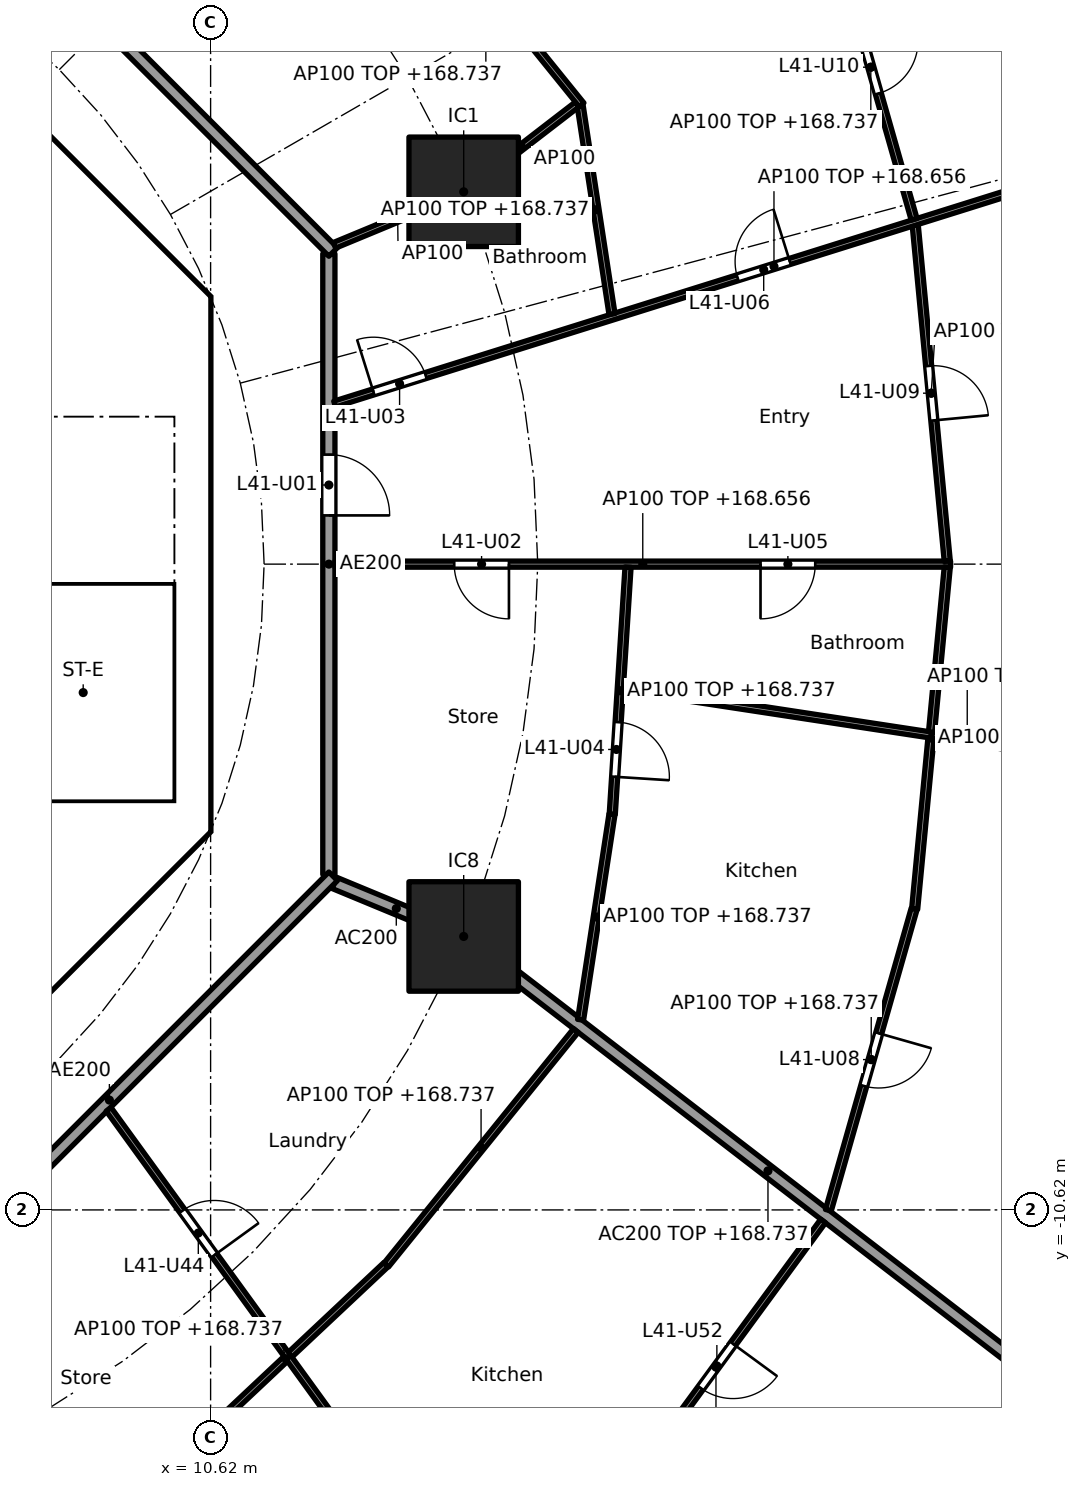
"""IFC4 building model, lengths in metres.
Left out: names, types, materials, properties, quantities, classifications, styles, units other than length and angle.
Written with IfcOpenShell. Run it as: python <this file> out.ifc"""

import sys

from ifc_helpers import new_model, si_unit, direction, frame, frame_2d, origin, origin_2d, place, context, subcontext, project, spatial, polyline, rectangle, outline, extrude, element, fill, save


model = new_model("IFC4")
c1 = context("Model", 3, precision=1e-05, world=origin(), true_north=direction((0.0, 1.0)))
c2 = subcontext(c1, "Body", "Model", "MODEL_VIEW")
j1 = project(units=[si_unit("LENGTHUNIT", "METRE"), si_unit("PLANEANGLEUNIT", "RADIAN")], contexts=[c1])
p1 = place(None, origin())
s1 = spatial("IfcSite", under=j1, at=p1, CompositionType="ELEMENT")
p2 = place(p1, origin())
s2 = spatial("IfcBuilding", under=s1, at=p2, CompositionType="ELEMENT")
p3 = place(p2, frame((0.0, 0.0, 165.9)))
s3 = spatial("IfcBuildingStorey", under=s2, at=p3, CompositionType="ELEMENT", Elevation=165.9)
for number, where, z_axis, x_axis in (
    (1, (14.782, 6.123, 0.0), (0.0, 0.0, 1.0), (1.0, 0.0, 0.0)),
    (2, (14.782, -6.123, 0.0), (0.0, 0.0, 1.0), (1.0, 0.0, 0.0)),
):
    element("IfcColumn", number, at=place(p3, frame(where, z_axis=z_axis, x_axis=x_axis)), inside=s3, PredefinedType="COLUMN", context=c2, shape_type="SweptSolid", body=[
        extrude(rectangle(XDim=1.8, YDim=1.8, at=origin_2d()), origin(), (0.0, 0.0, 1.0), 3.7),
    ])
p4 = place(p3, frame((9.988, 4.613, 0.0), z_axis=(0.0, 0.0, 1.0), x_axis=(-0.707106781187, 0.707106781187, 0.0)))
e3 = element("IfcWall", 3, at=p4, inside=s3, PredefinedType="SHEAR", context=c2, shape_type="SweptSolid", body=[
    extrude(rectangle(XDim=7.602, YDim=0.6, at=frame_2d((3.801, 0.0))), origin(), (0.0, 0.0, 1.0), 3.44),
])
p5 = place(p4, frame((3.201, 0.0, 0.0)))
e4 = element("IfcOpeningElement", 4, at=p5, cuts=e3, PredefinedType="OPENING", context=c2, shape_type="SweptSolid", body=[
    extrude(rectangle(XDim=1.2, YDim=2.1, at=frame_2d((0.6, 1.05))), frame((0.0, 0.31, 0.0), z_axis=(0.0, -1.0, 0.0), x_axis=(1.0, 0.0, 0.0)), (0.0, 0.0, 1.0), 0.62),
])
p6 = place(p3, frame((4.613, -9.988, 0.0), z_axis=(0.0, 0.0, 1.0), x_axis=(0.707106781187, 0.707106781187, 0.0)))
e5 = element("IfcWall", 5, at=p6, inside=s3, PredefinedType="SHEAR", context=c2, shape_type="SweptSolid", body=[
    extrude(rectangle(XDim=7.602, YDim=0.6, at=frame_2d((3.801, 0.0))), origin(), (0.0, 0.0, 1.0), 3.44),
])
p7 = place(p6, frame((3.201, 0.0, 0.0)))
e6 = element("IfcOpeningElement", 6, at=p7, cuts=e5, PredefinedType="OPENING", context=c2, shape_type="SweptSolid", body=[
    extrude(rectangle(XDim=1.2, YDim=2.1, at=frame_2d((0.6, 1.05))), frame((0.0, 0.31, 0.0), z_axis=(0.0, -1.0, 0.0), x_axis=(1.0, 0.0, 0.0)), (0.0, 0.0, 1.0), 0.62),
])
p8 = place(p3, frame((6.7, 4.0, 0.0), z_axis=(0.0, 0.0, 1.0), x_axis=(1.0, 0.0, 0.0)))
e7 = element("IfcWall", 7, at=p8, inside=s3, PredefinedType="SOLIDWALL", context=c2, shape_type="SweptSolid", body=[
    extrude(rectangle(XDim=3.325, YDim=0.2, at=frame_2d((1.662, 0.0))), origin(), (0.0, 0.0, 1.0), 3.44),
])
p9 = place(p8, frame((1.25, 0.0, 0.0)))
e8 = element("IfcOpeningElement", 8, at=p9, cuts=e7, PredefinedType="OPENING", context=c2, shape_type="SweptSolid", body=[
    extrude(rectangle(XDim=1.1, YDim=2.1, at=frame_2d((0.55, 1.05))), frame((0.0, 0.11, 0.0), z_axis=(0.0, -1.0, 0.0), x_axis=(1.0, 0.0, 0.0)), (0.0, 0.0, 1.0), 0.22),
])
p10 = place(p3, origin())
e9 = element("IfcWall", 9, at=p10, inside=s3, PredefinedType="SHEAR", context=c2, shape_type="SweptSolid", body=[
    extrude(outline(polyline([(9.776, -4.401), (10.025, -4.152), (10.025, -3.801), (10.025, 4.152), (9.776, 4.401), (10.2, 4.825), (10.625, 4.401), (10.625, -4.401), (10.2, -4.825), (9.776, -4.401)])), origin(), (0.0, 0.0, 1.0), 3.44),
])
p11 = place(p3, origin())
e10 = element("IfcWall", 10, at=p11, inside=s3, PredefinedType="SOLIDWALL", context=c2, shape_type="SweptSolid", body=[
    extrude(outline(polyline([(10.025, -4.1), (6.7, -4.1), (6.7, -3.9), (10.025, -3.9), (10.025, -4.1)])), origin(), (0.0, 0.0, 1.0), 3.44),
])
p12 = place(p3, frame((12.657, -5.243, 0.0), z_axis=(0.0, 0.0, 1.0), x_axis=(0.92383017907, -0.382802560388, 0.0)))
e11 = element("IfcWall", 11, at=p12, inside=s3, PredefinedType="PARTITIONING", context=c2, shape_type="SweptSolid", body=[
    extrude(rectangle(XDim=2.2, YDim=0.2, at=frame_2d((1.1, 0.0))), origin(), (0.0, 0.0, 1.0), 3.44),
])
p13 = place(p3, frame((14.822, -6.154, 0.0), z_axis=(0.0, 0.0, 1.0), x_axis=(0.792203056092, -0.610257583254, 0.0)))
e12 = element("IfcWall", 12, at=p13, inside=s3, PredefinedType="PARTITIONING", context=c2, shape_type="SweptSolid", body=[
    extrude(rectangle(XDim=12.533, YDim=0.2, at=frame_2d((6.266, 0.0))), origin(), (0.0, 0.0, 1.0), 2.837),
])
p14 = place(p3, frame((12.565, -5.104, 0.0), z_axis=(0.0, 0.0, 1.0), x_axis=(0.0, 1.0, 0.0)))
e13 = element("IfcWall", 13, at=p14, inside=s3, PredefinedType="PARTITIONING", context=c2, shape_type="SweptSolid", body=[
    extrude(rectangle(XDim=10.209, YDim=0.2, at=frame_2d((5.104, 0.0))), origin(), (0.0, 0.0, 1.0), 3.44),
])
p15 = place(p14, frame((5.906, 0.0, 0.0)))
e14 = element("IfcOpeningElement", 14, at=p15, cuts=e13, PredefinedType="OPENING", context=c2, shape_type="SweptSolid", body=[
    extrude(rectangle(XDim=1.0, YDim=2.1, at=frame_2d((0.5, 1.05))), frame((0.0, 0.11, 0.0), z_axis=(0.0, -1.0, 0.0), x_axis=(1.0, 0.0, 0.0)), (0.0, 0.0, 1.0), 0.22),
])
p16 = place(p3, frame((12.635, 5.134, 0.0), z_axis=(0.0, 0.0, 1.0), x_axis=(-0.707106781187, 0.707106781187, 0.0)))
e15 = element("IfcWall", 15, at=p16, inside=s3, PredefinedType="PARTITIONING", context=c2, shape_type="SweptSolid", body=[
    extrude(rectangle(XDim=10.609, YDim=0.2, at=frame_2d((5.305, 0.0))), origin(), (0.0, 0.0, 1.0), 3.44),
])
p17 = place(p3, frame((5.275, -12.494, 0.0), z_axis=(0.0, 0.0, 1.0), x_axis=(0.707106781187, 0.707106781187, 0.0)))
e16 = element("IfcWall", 16, at=p17, inside=s3, PredefinedType="PARTITIONING", context=c2, shape_type="SweptSolid", body=[
    extrude(rectangle(XDim=10.409, YDim=0.2, at=frame_2d((5.205, 0.0))), origin(), (0.0, 0.0, 1.0), 3.44),
])
p18 = place(p3, frame((12.665, 0.0, 0.0), z_axis=(0.0, 0.0, 1.0), x_axis=(1.0, 0.0, 0.0)))
e17 = element("IfcWall", 17, at=p18, inside=s3, PredefinedType="PARTITIONING", context=c2, shape_type="SweptSolid", body=[
    extrude(rectangle(XDim=10.124, YDim=0.1, at=frame_2d((5.062, 0.0))), origin(), (0.0, 0.0, 1.0), 2.756),
])
p19 = place(p18, frame((1.961, 0.0, 0.0)))
e18 = element("IfcOpeningElement", 18, at=p19, cuts=e17, PredefinedType="OPENING", context=c2, shape_type="SweptSolid", body=[
    extrude(rectangle(XDim=0.9, YDim=2.1, at=frame_2d((0.45, 1.05))), frame((0.0, 0.06, 0.0), z_axis=(0.0, -1.0, 0.0), x_axis=(1.0, 0.0, 0.0)), (0.0, 0.0, 1.0), 0.12),
])
p20 = place(p18, frame((6.999, 0.0, 0.0)))
e19 = element("IfcOpeningElement", 19, at=p20, cuts=e17, PredefinedType="OPENING", context=c2, shape_type="SweptSolid", body=[
    extrude(rectangle(XDim=0.9, YDim=2.1, at=frame_2d((0.45, 1.05))), frame((0.0, 0.06, 0.0), z_axis=(0.0, -1.0, 0.0), x_axis=(1.0, 0.0, 0.0)), (0.0, 0.0, 1.0), 0.12),
])
p21 = place(p3, frame((17.485, -0.05, 0.0), z_axis=(0.0, 0.0, 1.0), x_axis=(-0.063673473968, -0.997970785501, 0.0)))
e20 = element("IfcWall", 20, at=p21, inside=s3, PredefinedType="PARTITIONING", context=c2, shape_type="SweptSolid", body=[
    extrude(rectangle(XDim=4.072, YDim=0.1, at=frame_2d((2.036, 0.0))), origin(), (0.0, 0.0, 1.0), 2.837),
])
p22 = place(p21, frame((2.554, 0.0, 0.0)))
e21 = element("IfcOpeningElement", 21, at=p22, cuts=e20, PredefinedType="OPENING", context=c2, shape_type="SweptSolid", body=[
    extrude(rectangle(XDim=0.9, YDim=2.1, at=frame_2d((0.45, 1.05))), frame((0.0, 0.06, 0.0), z_axis=(0.0, -1.0, 0.0), x_axis=(1.0, 0.0, 0.0)), (0.0, 0.0, 1.0), 0.12),
])
p23 = place(p3, frame((22.734, 0.05, 0.0), z_axis=(0.0, 0.0, 1.0), x_axis=(-0.094923312677, 0.995484587882, 0.0)))
e22 = element("IfcWall", 22, at=p23, inside=s3, PredefinedType="PARTITIONING", context=c2, shape_type="SweptSolid", body=[
    extrude(rectangle(XDim=5.548, YDim=0.1, at=frame_2d((2.774, 0.0))), origin(), (0.0, 0.0, 1.0), 2.837),
])
p24 = place(p23, frame((2.324, 0.0, 0.0)))
e23 = element("IfcOpeningElement", 23, at=p24, cuts=e22, PredefinedType="OPENING", context=c2, shape_type="SweptSolid", body=[
    extrude(rectangle(XDim=0.9, YDim=2.1, at=frame_2d((0.45, 1.05))), frame((0.0, 0.06, 0.0), z_axis=(0.0, -1.0, 0.0), x_axis=(1.0, 0.0, 0.0)), (0.0, 0.0, 1.0), 0.12),
])
p25 = place(p3, frame((22.734, -0.05, 0.0), z_axis=(0.0, 0.0, 1.0), x_axis=(-0.0949274088, -0.995484197292, 0.0)))
e24 = element("IfcWall", 24, at=p25, inside=s3, PredefinedType="PARTITIONING", context=c2, shape_type="SweptSolid", body=[
    extrude(rectangle(XDim=5.648, YDim=0.1, at=frame_2d((2.824, 0.0))), origin(), (0.0, 0.0, 1.0), 2.837),
])
p26 = place(p3, frame((12.66, 2.632, 0.0), z_axis=(0.0, 0.0, 1.0), x_axis=(0.954248738607, 0.299013954302, 0.0)))
e25 = element("IfcWall", 25, at=p26, inside=s3, PredefinedType="PARTITIONING", context=c2, shape_type="SweptSolid", body=[
    extrude(rectangle(XDim=15.142, YDim=0.1, at=frame_2d((7.571, 0.0))), origin(), (0.0, 0.0, 1.0), 2.756),
])
p27 = place(p26, frame((0.669, 0.0, 0.0)))
e26 = element("IfcOpeningElement", 26, at=p27, cuts=e25, PredefinedType="OPENING", context=c2, shape_type="SweptSolid", body=[
    extrude(rectangle(XDim=0.9, YDim=2.1, at=frame_2d((0.45, 1.05))), frame((0.0, 0.06, 0.0), z_axis=(0.0, -1.0, 0.0), x_axis=(1.0, 0.0, 0.0)), (0.0, 0.0, 1.0), 0.12),
])
p28 = place(p26, frame((6.944, 0.0, 0.0)))
e27 = element("IfcOpeningElement", 27, at=p28, cuts=e25, PredefinedType="OPENING", context=c2, shape_type="SweptSolid", body=[
    extrude(rectangle(XDim=0.9, YDim=2.1, at=frame_2d((0.45, 1.05))), frame((0.0, 0.06, 0.0), z_axis=(0.0, -1.0, 0.0), x_axis=(1.0, 0.0, 0.0)), (0.0, 0.0, 1.0), 0.12),
])
p29 = place(p3, frame((17.221, 4.113, 0.0), z_axis=(0.0, 0.0, 1.0), x_axis=(-0.151078880423, 0.988521710379, 0.0)))
e28 = element("IfcWall", 28, at=p29, inside=s3, PredefinedType="PARTITIONING", context=c2, shape_type="SweptSolid", body=[
    extrude(rectangle(XDim=3.469, YDim=0.1, at=frame_2d((1.735, 0.0))), origin(), (0.0, 0.0, 1.0), 2.837),
])
p30 = place(p3, frame((22.189, 5.67, 0.0), z_axis=(0.0, 0.0, 1.0), x_axis=(-0.273815967041, 0.961782104322, 0.0)))
e29 = element("IfcWall", 29, at=p30, inside=s3, PredefinedType="PARTITIONING", context=c2, shape_type="SweptSolid", body=[
    extrude(rectangle(XDim=5.202, YDim=0.1, at=frame_2d((2.601, 0.0))), origin(), (0.0, 0.0, 1.0), 2.837),
])
p31 = place(p30, frame((2.151, 0.0, 0.0)))
e30 = element("IfcOpeningElement", 30, at=p31, cuts=e29, PredefinedType="OPENING", context=c2, shape_type="SweptSolid", body=[
    extrude(rectangle(XDim=0.9, YDim=2.1, at=frame_2d((0.45, 1.05))), frame((0.0, 0.06, 0.0), z_axis=(0.0, -1.0, 0.0), x_axis=(1.0, 0.0, 0.0)), (0.0, 0.0, 1.0), 0.12),
])
p32 = place(p3, frame((12.657, 5.243, 0.0), z_axis=(0.0, 0.0, 1.0), x_axis=(0.923826362943, 0.382811769845, 0.0)))
e31 = element("IfcWall", 31, at=p32, inside=s3, PredefinedType="PARTITIONING", context=c2, shape_type="SweptSolid", body=[
    extrude(rectangle(XDim=2.25, YDim=0.1, at=frame_2d((1.125, 0.0))), origin(), (0.0, 0.0, 1.0), 3.44),
])
p33 = place(p3, frame((14.822, 6.154, 0.0), z_axis=(0.0, 0.0, 1.0), x_axis=(0.792226528082, 0.610227111987, 0.0)))
e32 = element("IfcWall", 32, at=p33, inside=s3, PredefinedType="PARTITIONING", context=c2, shape_type="SweptSolid", body=[
    extrude(rectangle(XDim=2.307, YDim=0.1, at=frame_2d((1.154, 0.0))), origin(), (0.0, 0.0, 1.0), 3.44),
])
p34 = place(p3, frame((16.721, 7.553, 0.0), z_axis=(0.0, 0.0, 1.0), x_axis=(-0.628753513808, 0.777604667472, 0.0)))
e33 = element("IfcWall", 33, at=p34, inside=s3, PredefinedType="PARTITIONING", context=c2, shape_type="SweptSolid", body=[
    extrude(rectangle(XDim=5.007, YDim=0.1, at=frame_2d((2.504, 0.0))), origin(), (0.0, 0.0, 1.0), 2.837),
])
p35 = place(p34, frame((2.079, 0.0, 0.0)))
e34 = element("IfcOpeningElement", 34, at=p35, cuts=e33, PredefinedType="OPENING", context=c2, shape_type="SweptSolid", body=[
    extrude(rectangle(XDim=0.9, YDim=2.1, at=frame_2d((0.45, 1.05))), frame((0.0, 0.06, 0.0), z_axis=(0.0, -1.0, 0.0), x_axis=(1.0, 0.0, 0.0)), (0.0, 0.0, 1.0), 0.12),
])
p36 = place(p3, frame((10.21, -14.614, 0.0), z_axis=(0.0, 0.0, 1.0), x_axis=(0.728883199496, 0.684638066055, 0.0)))
e35 = element("IfcWall", 35, at=p36, inside=s3, PredefinedType="PARTITIONING", context=c2, shape_type="SweptSolid", body=[
    extrude(rectangle(XDim=4.519, YDim=0.1, at=frame_2d((2.26, 0.0))), origin(), (0.0, 0.0, 1.0), 2.837),
])
p37 = place(p3, frame((8.943, -8.966, 0.0), z_axis=(0.0, 0.0, 1.0), x_axis=(0.586803608919, -0.809729290912, 0.0)))
e36 = element("IfcWall", 36, at=p37, inside=s3, PredefinedType="PARTITIONING", context=c2, shape_type="SweptSolid", body=[
    extrude(rectangle(XDim=17.179, YDim=0.1, at=frame_2d((8.589, 0.0))), origin(), (0.0, 0.0, 1.0), 2.756),
])
p38 = place(p37, frame((2.062, 0.0, 0.0)))
e37 = element("IfcOpeningElement", 37, at=p38, cuts=e36, PredefinedType="OPENING", context=c2, shape_type="SweptSolid", body=[
    extrude(rectangle(XDim=0.9, YDim=2.1, at=frame_2d((0.45, 1.05))), frame((0.0, 0.06, 0.0), z_axis=(0.0, -1.0, 0.0), x_axis=(1.0, 0.0, 0.0)), (0.0, 0.0, 1.0), 0.12),
])
p39 = place(p37, frame((7.308, 0.0, 0.0)))
e38 = element("IfcOpeningElement", 38, at=p39, cuts=e36, PredefinedType="OPENING", context=c2, shape_type="SweptSolid", body=[
    extrude(rectangle(XDim=0.9, YDim=2.1, at=frame_2d((0.45, 1.05))), frame((0.0, 0.06, 0.0), z_axis=(0.0, -1.0, 0.0), x_axis=(1.0, 0.0, 0.0)), (0.0, 0.0, 1.0), 0.12),
])
p40 = place(p3, frame((13.509, -11.525, 0.0), z_axis=(0.0, 0.0, 1.0), x_axis=(0.628764602857, 0.777595700987, 0.0)))
e39 = element("IfcWall", 39, at=p40, inside=s3, PredefinedType="PARTITIONING", context=c2, shape_type="SweptSolid", body=[
    extrude(rectangle(XDim=4.957, YDim=0.1, at=frame_2d((2.479, 0.0))), origin(), (0.0, 0.0, 1.0), 2.837),
])
p41 = place(p3, frame((17.169, -15.609, 0.0), z_axis=(0.0, 0.0, 1.0), x_axis=(0.591122127251, 0.806582066918, 0.0)))
e40 = element("IfcWall", 40, at=p41, inside=s3, PredefinedType="PARTITIONING", context=c2, shape_type="SweptSolid", body=[
    extrude(rectangle(XDim=5.96, YDim=0.1, at=frame_2d((2.98, 0.0))), origin(), (0.0, 0.0, 1.0), 2.837),
])
p42 = place(p41, frame((2.555, 0.0, 0.0)))
e41 = element("IfcOpeningElement", 41, at=p42, cuts=e40, PredefinedType="OPENING", context=c2, shape_type="SweptSolid", body=[
    extrude(rectangle(XDim=0.9, YDim=2.1, at=frame_2d((0.45, 1.05))), frame((0.0, 0.06, 0.0), z_axis=(0.0, -1.0, 0.0), x_axis=(1.0, 0.0, 0.0)), (0.0, 0.0, 1.0), 0.12),
])
p43 = place(p3, frame((16.704, -7.493, 0.0), z_axis=(0.0, 0.0, 1.0), x_axis=(0.1510806336, 0.988521442434, 0.0)))
e42 = element("IfcWall", 42, at=p43, inside=s3, PredefinedType="PARTITIONING", context=c2, shape_type="SweptSolid", body=[
    extrude(rectangle(XDim=3.419, YDim=0.1, at=frame_2d((1.71, 0.0))), origin(), (0.0, 0.0, 1.0), 2.837),
])
p44 = place(p3, frame((20.779, -10.625, 0.0), z_axis=(0.0, 0.0, 1.0), x_axis=(0.273819702124, 0.961781040949, 0.0)))
e43 = element("IfcWall", 43, at=p44, inside=s3, PredefinedType="PARTITIONING", context=c2, shape_type="SweptSolid", body=[
    extrude(rectangle(XDim=5.152, YDim=0.1, at=frame_2d((2.576, 0.0))), origin(), (0.0, 0.0, 1.0), 2.837),
])
p45 = place(p44, frame((2.126, 0.0, 0.0)))
e44 = element("IfcOpeningElement", 44, at=p45, cuts=e43, PredefinedType="OPENING", context=c2, shape_type="SweptSolid", body=[
    extrude(rectangle(XDim=0.9, YDim=2.1, at=frame_2d((0.45, 1.05))), frame((0.0, 0.06, 0.0), z_axis=(0.0, -1.0, 0.0), x_axis=(1.0, 0.0, 0.0)), (0.0, 0.0, 1.0), 0.12),
])
p46 = place(p3, frame((17.407, -2.039, 0.0), z_axis=(0.0, 0.0, 1.0), x_axis=(0.98858728603, -0.150649188184, 0.0)))
e45 = element("IfcWall", 45, at=p46, inside=s3, PredefinedType="PARTITIONING", context=c2, shape_type="SweptSolid", body=[
    extrude(rectangle(XDim=11.441, YDim=0.1, at=frame_2d((5.721, 0.0))), origin(), (0.0, 0.0, 1.0), 2.905),
])
p47 = place(p9, frame((1.1, 0.0, 0.0), x_axis=(-1.0, 0.0, 0.0)))
e46 = element("IfcDoor", 46, at=p47, inside=s3, OperationType="SINGLE_SWING_RIGHT", PredefinedType="DOOR", context=c2, shape_type="SweptSolid", body=[
    extrude(rectangle(XDim=1.1, YDim=2.1, at=frame_2d((0.55, 1.05))), frame((0.0, 0.025, 0.0), z_axis=(0.0, -1.0, 0.0), x_axis=(1.0, 0.0, 0.0)), (0.0, 0.0, 1.0), 0.05),
])
fill(e8, e46)
p48 = place(p15, frame((1.0, 0.0, 0.0), x_axis=(-1.0, 0.0, 0.0)))
e47 = element("IfcDoor", 47, at=p48, inside=s3, OperationType="SINGLE_SWING_RIGHT", PredefinedType="DOOR", context=c2, shape_type="SweptSolid", body=[
    extrude(rectangle(XDim=1.0, YDim=2.1, at=frame_2d((0.5, 1.05))), frame((0.0, 0.025, 0.0), z_axis=(0.0, -1.0, 0.0), x_axis=(1.0, 0.0, 0.0)), (0.0, 0.0, 1.0), 0.05),
])
fill(e14, e47)
p49 = place(p19, frame((0.9, 0.0, 0.0), x_axis=(-1.0, 0.0, 0.0)))
e48 = element("IfcDoor", 48, at=p49, inside=s3, OperationType="SINGLE_SWING_LEFT", PredefinedType="DOOR", context=c2, shape_type="SweptSolid", body=[
    extrude(rectangle(XDim=0.9, YDim=2.1, at=frame_2d((0.45, 1.05))), frame((0.0, 0.025, 0.0), z_axis=(0.0, -1.0, 0.0), x_axis=(1.0, 0.0, 0.0)), (0.0, 0.0, 1.0), 0.05),
])
fill(e18, e48)
p50 = place(p27, origin())
e49 = element("IfcDoor", 49, at=p50, inside=s3, OperationType="SINGLE_SWING_LEFT", PredefinedType="DOOR", context=c2, shape_type="SweptSolid", body=[
    extrude(rectangle(XDim=0.9, YDim=2.1, at=frame_2d((0.45, 1.05))), frame((0.0, 0.025, 0.0), z_axis=(0.0, -1.0, 0.0), x_axis=(1.0, 0.0, 0.0)), (0.0, 0.0, 1.0), 0.05),
])
fill(e26, e49)
p51 = place(p22, origin())
e50 = element("IfcDoor", 50, at=p51, inside=s3, OperationType="SINGLE_SWING_RIGHT", PredefinedType="DOOR", context=c2, shape_type="SweptSolid", body=[
    extrude(rectangle(XDim=0.9, YDim=2.1, at=frame_2d((0.45, 1.05))), frame((0.0, 0.025, 0.0), z_axis=(0.0, -1.0, 0.0), x_axis=(1.0, 0.0, 0.0)), (0.0, 0.0, 1.0), 0.05),
])
fill(e21, e50)
p52 = place(p20, frame((0.9, 0.0, 0.0), x_axis=(-1.0, 0.0, 0.0)))
e51 = element("IfcDoor", 51, at=p52, inside=s3, OperationType="SINGLE_SWING_RIGHT", PredefinedType="DOOR", context=c2, shape_type="SweptSolid", body=[
    extrude(rectangle(XDim=0.9, YDim=2.1, at=frame_2d((0.45, 1.05))), frame((0.0, 0.025, 0.0), z_axis=(0.0, -1.0, 0.0), x_axis=(1.0, 0.0, 0.0)), (0.0, 0.0, 1.0), 0.05),
])
fill(e19, e51)
p53 = place(p28, origin())
e52 = element("IfcDoor", 52, at=p53, inside=s3, OperationType="SINGLE_SWING_RIGHT", PredefinedType="DOOR", context=c2, shape_type="SweptSolid", body=[
    extrude(rectangle(XDim=0.9, YDim=2.1, at=frame_2d((0.45, 1.05))), frame((0.0, 0.025, 0.0), z_axis=(0.0, -1.0, 0.0), x_axis=(1.0, 0.0, 0.0)), (0.0, 0.0, 1.0), 0.05),
])
fill(e27, e52)
p54 = place(p45, frame((0.9, 0.0, 0.0), x_axis=(-1.0, 0.0, 0.0)))
e53 = element("IfcDoor", 53, at=p54, inside=s3, OperationType="SINGLE_SWING_LEFT", PredefinedType="DOOR", context=c2, shape_type="SweptSolid", body=[
    extrude(rectangle(XDim=0.9, YDim=2.1, at=frame_2d((0.45, 1.05))), frame((0.0, 0.025, 0.0), z_axis=(0.0, -1.0, 0.0), x_axis=(1.0, 0.0, 0.0)), (0.0, 0.0, 1.0), 0.05),
])
fill(e44, e53)
p55 = place(p24, frame((0.9, 0.0, 0.0), x_axis=(-1.0, 0.0, 0.0)))
e54 = element("IfcDoor", 54, at=p55, inside=s3, OperationType="SINGLE_SWING_RIGHT", PredefinedType="DOOR", context=c2, shape_type="SweptSolid", body=[
    extrude(rectangle(XDim=0.9, YDim=2.1, at=frame_2d((0.45, 1.05))), frame((0.0, 0.025, 0.0), z_axis=(0.0, -1.0, 0.0), x_axis=(1.0, 0.0, 0.0)), (0.0, 0.0, 1.0), 0.05),
])
fill(e23, e54)
p56 = place(p31, frame((0.9, 0.0, 0.0), x_axis=(-1.0, 0.0, 0.0)))
e55 = element("IfcDoor", 55, at=p56, inside=s3, OperationType="SINGLE_SWING_LEFT", PredefinedType="DOOR", context=c2, shape_type="SweptSolid", body=[
    extrude(rectangle(XDim=0.9, YDim=2.1, at=frame_2d((0.45, 1.05))), frame((0.0, 0.025, 0.0), z_axis=(0.0, -1.0, 0.0), x_axis=(1.0, 0.0, 0.0)), (0.0, 0.0, 1.0), 0.05),
])
fill(e30, e55)
p57 = place(p38, origin())
e56 = element("IfcDoor", 56, at=p57, inside=s3, OperationType="SINGLE_SWING_RIGHT", PredefinedType="DOOR", context=c2, shape_type="SweptSolid", body=[
    extrude(rectangle(XDim=0.9, YDim=2.1, at=frame_2d((0.45, 1.05))), frame((0.0, 0.025, 0.0), z_axis=(0.0, -1.0, 0.0), x_axis=(1.0, 0.0, 0.0)), (0.0, 0.0, 1.0), 0.05),
])
fill(e37, e56)
p58 = place(p42, frame((0.9, 0.0, 0.0), x_axis=(-1.0, 0.0, 0.0)))
e57 = element("IfcDoor", 57, at=p58, inside=s3, OperationType="SINGLE_SWING_LEFT", PredefinedType="DOOR", context=c2, shape_type="SweptSolid", body=[
    extrude(rectangle(XDim=0.9, YDim=2.1, at=frame_2d((0.45, 1.05))), frame((0.0, 0.025, 0.0), z_axis=(0.0, -1.0, 0.0), x_axis=(1.0, 0.0, 0.0)), (0.0, 0.0, 1.0), 0.05),
])
fill(e41, e57)
save(model, sys.argv[1])
